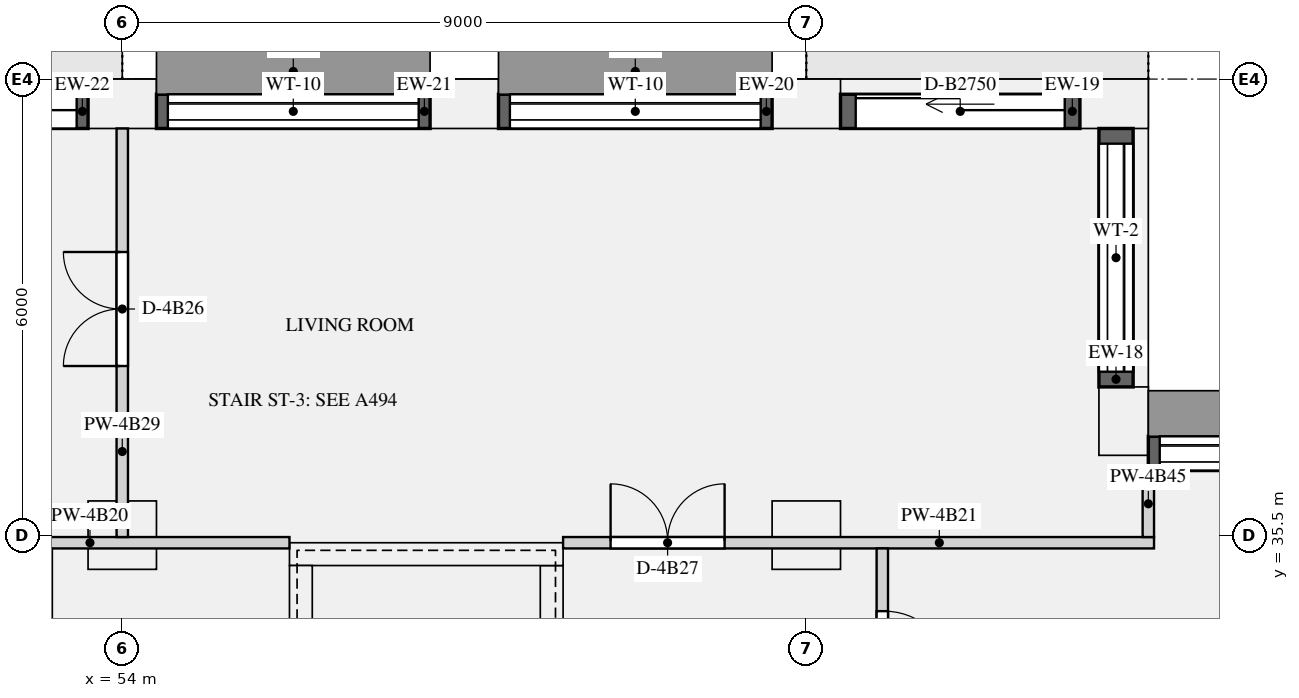
"""IFC4 building model, lengths in metres.
Left out: names, types, materials, properties, quantities, classifications, styles, units other than length and angle.
Written with IfcOpenShell. Run it as: python <this file> out.ifc"""

import sys

from ifc_helpers import new_model, si_unit, direction, frame, frame_2d, origin, origin_2d, place, context, subcontext, project, spatial, rectangle, extrude, element, fill, save


model = new_model("IFC4")
c1 = context("Model", 3, precision=1e-05, world=origin(), true_north=direction((0.0, 1.0)))
c2 = subcontext(c1, "Body", "Model", "MODEL_VIEW")
j1 = project(units=[si_unit("LENGTHUNIT", "METRE"), si_unit("PLANEANGLEUNIT", "RADIAN")], contexts=[c1])
p1 = place(None, origin())
s1 = spatial("IfcSite", under=j1, at=p1, CompositionType="ELEMENT")
p2 = place(p1, origin())
s2 = spatial("IfcBuilding", under=s1, at=p2, CompositionType="ELEMENT")
p3 = place(p2, frame((0.0, 0.0, 207.45)))
s3 = spatial("IfcBuildingStorey", under=s2, at=p3, CompositionType="ELEMENT", Elevation=207.45)
for number, where, z_axis, x_axis in (
    (1, (67.175, 37.0, 0.0), (0.0, 0.0, 1.0), (0.0, 1.0, 0.0)),
    (2, (67.05, 41.175, 0.0), (0.0, 0.0, 1.0), (-1.0, 0.0, 0.0)),
    (3, (63.0, 41.175, 0.0), (0.0, 0.0, 1.0), (-1.0, 0.0, 0.0)),
    (4, (58.5, 41.175, 0.0), (0.0, 0.0, 1.0), (-1.0, 0.0, 0.0)),
    (5, (54.0, 41.175, 0.0), (0.0, 0.0, 1.0), (-1.0, 0.0, 0.0)),
):
    element("IfcColumn", number, at=place(p3, frame(where, z_axis=z_axis, x_axis=x_axis)), inside=s3, PredefinedType="USERDEFINED", context=c2, shape_type="SweptSolid", body=[
        extrude(rectangle(XDim=0.9, YDim=0.65, at=origin_2d()), origin(), (0.0, 0.0, 1.0), 3.15),
    ])
for number, where, z_axis, x_axis in (
    (6, (54.0, 35.5, 0.0), (0.0, 0.0, 1.0), (1.0, 0.0, 0.0)),
    (7, (63.0, 35.5, 0.0), (0.0, 0.0, 1.0), (1.0, 0.0, 0.0)),
):
    element("IfcColumn", number, at=place(p3, frame(where, z_axis=z_axis, x_axis=x_axis)), inside=s3, PredefinedType="COLUMN", context=c2, shape_type="SweptSolid", body=[
        extrude(rectangle(XDim=0.9, YDim=0.9, at=origin_2d()), origin(), (0.0, 0.0, 1.0), 3.15),
    ])
p4 = place(p3, frame((56.2, 35.25, 0.0), z_axis=(0.0, 0.0, 1.0), x_axis=(1.0, 0.0, 0.0)))
e8 = element("IfcWall", 8, at=p4, inside=s3, PredefinedType="SHEAR", context=c2, shape_type="SweptSolid", body=[
    extrude(rectangle(XDim=3.6, YDim=0.3, at=frame_2d((1.8, 0.0))), origin(), (0.0, 0.0, 1.0), 3.15),
])
for number, where, z_axis, x_axis in (
    (9, (56.35, 27.3, 0.0), (0.0, 0.0, 1.0), (0.0, 1.0, 0.0)),
    (10, (59.65, 27.3, 0.0), (0.0, 0.0, 1.0), (0.0, 1.0, 0.0)),
):
    element("IfcWall", number, at=place(p3, frame(where, z_axis=z_axis, x_axis=x_axis)), inside=s3, PredefinedType="SHEAR", context=c2, shape_type="SweptSolid", body=[
        extrude(rectangle(XDim=7.8, YDim=0.3, at=frame_2d((3.9, 0.0))), origin(), (0.0, 0.0, 1.0), 3.15),
    ])
p5 = place(p3, frame((71.1, 36.575, 0.9), z_axis=(0.0, 0.0, 1.0), x_axis=(-1.0, 0.0, 0.0)))
e11 = element("IfcWall", 11, at=p5, inside=s3, PredefinedType="SOLIDWALL", context=c2, shape_type="SweptSolid", body=[
    extrude(rectangle(XDim=3.6, YDim=0.45, at=frame_2d((1.8, 0.0))), origin(), (0.0, 0.0, 1.0), 1.93),
])
p6 = place(p5, frame((0.15, 0.0, 0.15)))
e12 = element("IfcOpeningElement", 12, at=p6, cuts=e11, PredefinedType="OPENING", context=c2, shape_type="SweptSolid", body=[
    extrude(rectangle(XDim=3.3, YDim=1.5, at=frame_2d((1.65, 0.75))), frame((0.0, 0.235, 0.0), z_axis=(0.0, -1.0, 0.0), x_axis=(1.0, 0.0, 0.0)), (0.0, 0.0, 1.0), 0.47),
])
p7 = place(p3, frame((67.075, 37.45, 0.9), z_axis=(0.0, 0.0, 1.0), x_axis=(0.0, 1.0, 0.0)))
e13 = element("IfcWall", 13, at=p7, inside=s3, PredefinedType="SOLIDWALL", context=c2, shape_type="SweptSolid", body=[
    extrude(rectangle(XDim=3.4, YDim=0.45, at=frame_2d((1.7, 0.0))), origin(), (0.0, 0.0, 1.0), 1.93),
])
p8 = place(p7, frame((0.2, 0.0, 0.15)))
e14 = element("IfcOpeningElement", 14, at=p8, cuts=e13, PredefinedType="OPENING", context=c2, shape_type="SweptSolid", body=[
    extrude(rectangle(XDim=3.0, YDim=1.5, at=frame_2d((1.5, 0.75))), frame((0.0, 0.235, 0.0), z_axis=(0.0, -1.0, 0.0), x_axis=(1.0, 0.0, 0.0)), (0.0, 0.0, 1.0), 0.47),
])
p9 = place(p3, frame((66.6, 41.075, 0.0), z_axis=(0.0, 0.0, 1.0), x_axis=(-1.0, 0.0, 0.0)))
e15 = element("IfcWall", 15, at=p9, inside=s3, PredefinedType="SOLIDWALL", context=c2, shape_type="SweptSolid", body=[
    extrude(rectangle(XDim=3.15, YDim=0.45, at=frame_2d((1.575, 0.0))), origin(), (0.0, 0.0, 1.0), 2.83),
])
p10 = place(p9, frame((0.2, 0.0, 0.0)))
e16 = element("IfcOpeningElement", 16, at=p10, cuts=e15, PredefinedType="OPENING", context=c2, shape_type="SweptSolid", body=[
    extrude(rectangle(XDim=2.75, YDim=2.3, at=frame_2d((1.375, 1.15))), frame((0.0, 0.235, 0.0), z_axis=(0.0, -1.0, 0.0), x_axis=(1.0, 0.0, 0.0)), (0.0, 0.0, 1.0), 0.47),
])
p11 = place(p3, frame((62.55, 41.075, 0.9), z_axis=(0.0, 0.0, 1.0), x_axis=(-1.0, 0.0, 0.0)))
e17 = element("IfcWall", 17, at=p11, inside=s3, PredefinedType="SOLIDWALL", context=c2, shape_type="SweptSolid", body=[
    extrude(rectangle(XDim=3.6, YDim=0.45, at=frame_2d((1.8, 0.0))), origin(), (0.0, 0.0, 1.0), 1.93),
])
p12 = place(p11, frame((0.15, 0.0, 0.15)))
e18 = element("IfcOpeningElement", 18, at=p12, cuts=e17, PredefinedType="OPENING", context=c2, shape_type="SweptSolid", body=[
    extrude(rectangle(XDim=3.3, YDim=1.5, at=frame_2d((1.65, 0.75))), frame((0.0, 0.235, 0.0), z_axis=(0.0, -1.0, 0.0), x_axis=(1.0, 0.0, 0.0)), (0.0, 0.0, 1.0), 0.47),
])
p13 = place(p3, frame((58.05, 41.075, 0.9), z_axis=(0.0, 0.0, 1.0), x_axis=(-1.0, 0.0, 0.0)))
e19 = element("IfcWall", 19, at=p13, inside=s3, PredefinedType="SOLIDWALL", context=c2, shape_type="SweptSolid", body=[
    extrude(rectangle(XDim=3.6, YDim=0.45, at=frame_2d((1.8, 0.0))), origin(), (0.0, 0.0, 1.0), 1.93),
])
p14 = place(p13, frame((0.15, 0.0, 0.15)))
e20 = element("IfcOpeningElement", 20, at=p14, cuts=e19, PredefinedType="OPENING", context=c2, shape_type="SweptSolid", body=[
    extrude(rectangle(XDim=3.3, YDim=1.5, at=frame_2d((1.65, 0.75))), frame((0.0, 0.235, 0.0), z_axis=(0.0, -1.0, 0.0), x_axis=(1.0, 0.0, 0.0)), (0.0, 0.0, 1.0), 0.47),
])
p15 = place(p3, frame((53.55, 41.075, 0.0), z_axis=(0.0, 0.0, 1.0), x_axis=(-1.0, 0.0, 0.0)))
e21 = element("IfcWall", 21, at=p15, inside=s3, PredefinedType="SOLIDWALL", context=c2, shape_type="SweptSolid", body=[
    extrude(rectangle(XDim=3.6, YDim=0.45, at=frame_2d((1.8, 0.0))), origin(), (0.0, 0.0, 1.0), 2.83),
])
p16 = place(p15, frame((0.15, 0.0, 0.0)))
e22 = element("IfcOpeningElement", 22, at=p16, cuts=e21, PredefinedType="OPENING", context=c2, shape_type="SweptSolid", body=[
    extrude(rectangle(XDim=3.3, YDim=2.3, at=frame_2d((1.65, 1.15))), frame((0.0, 0.235, 0.0), z_axis=(0.0, -1.0, 0.0), x_axis=(1.0, 0.0, 0.0)), (0.0, 0.0, 1.0), 0.47),
])
p17 = place(p3, frame((45.0, 35.4, 0.0), z_axis=(0.0, 0.0, 1.0), x_axis=(1.0, 0.0, 0.0)))
e23 = element("IfcWall", 23, at=p17, inside=s3, PredefinedType="PARTITIONING", context=c2, shape_type="SweptSolid", body=[
    extrude(rectangle(XDim=11.2, YDim=0.15, at=frame_2d((5.6, 0.0))), origin(), (0.0, 0.0, 1.0), 2.83),
])
p18 = place(p17, frame((0.975, 0.0, 0.0)))
e24 = element("IfcOpeningElement", 24, at=p18, cuts=e23, PredefinedType="OPENING", context=c2, shape_type="SweptSolid", body=[
    extrude(rectangle(XDim=1.5, YDim=2.1, at=frame_2d((0.75, 1.05))), frame((0.0, 0.085, 0.0), z_axis=(0.0, -1.0, 0.0), x_axis=(1.0, 0.0, 0.0)), (0.0, 0.0, 1.0), 0.17),
])
p19 = place(p17, frame((5.05, 0.0, 0.0)))
e25 = element("IfcOpeningElement", 25, at=p19, cuts=e23, PredefinedType="OPENING", context=c2, shape_type="SweptSolid", body=[
    extrude(rectangle(XDim=0.9, YDim=2.1, at=frame_2d((0.45, 1.05))), frame((0.0, 0.085, 0.0), z_axis=(0.0, -1.0, 0.0), x_axis=(1.0, 0.0, 0.0)), (0.0, 0.0, 1.0), 0.17),
])
p20 = place(p3, frame((59.8, 35.4, 0.0), z_axis=(0.0, 0.0, 1.0), x_axis=(1.0, 0.0, 0.0)))
e26 = element("IfcWall", 26, at=p20, inside=s3, PredefinedType="PARTITIONING", context=c2, shape_type="SweptSolid", body=[
    extrude(rectangle(XDim=7.775, YDim=0.15, at=frame_2d((3.887, 0.0))), origin(), (0.0, 0.0, 1.0), 2.83),
])
p21 = place(p20, frame((0.625, 0.0, 0.0)))
e27 = element("IfcOpeningElement", 27, at=p21, cuts=e26, PredefinedType="OPENING", context=c2, shape_type="SweptSolid", body=[
    extrude(rectangle(XDim=1.5, YDim=2.1, at=frame_2d((0.75, 1.05))), frame((0.0, 0.085, 0.0), z_axis=(0.0, -1.0, 0.0), x_axis=(1.0, 0.0, 0.0)), (0.0, 0.0, 1.0), 0.17),
])
p22 = place(p3, frame((54.0, 35.475, 0.0), z_axis=(0.0, 0.0, 1.0), x_axis=(0.0, 1.0, 0.0)))
e28 = element("IfcWall", 28, at=p22, inside=s3, PredefinedType="PARTITIONING", context=c2, shape_type="SweptSolid", body=[
    extrude(rectangle(XDim=5.375, YDim=0.15, at=frame_2d((2.688, 0.0))), origin(), (0.0, 0.0, 1.0), 2.83),
])
p23 = place(p22, frame((2.25, 0.0, 0.0)))
e29 = element("IfcOpeningElement", 29, at=p23, cuts=e28, PredefinedType="OPENING", context=c2, shape_type="SweptSolid", body=[
    extrude(rectangle(XDim=1.5, YDim=2.1, at=frame_2d((0.75, 1.05))), frame((0.0, 0.085, 0.0), z_axis=(0.0, -1.0, 0.0), x_axis=(1.0, 0.0, 0.0)), (0.0, 0.0, 1.0), 0.17),
])
p24 = place(p3, frame((67.5, 35.475, 0.0), z_axis=(0.0, 0.0, 1.0), x_axis=(0.0, 1.0, 0.0)))
e30 = element("IfcWall", 30, at=p24, inside=s3, PredefinedType="PARTITIONING", context=c2, shape_type="SweptSolid", body=[
    extrude(rectangle(XDim=0.875, YDim=0.15, at=frame_2d((0.438, 0.0))), origin(), (0.0, 0.0, 1.0), 2.83),
])
p25 = place(p3, frame((64.0, 28.6, 0.0), z_axis=(0.0, 0.0, 1.0), x_axis=(0.0, 1.0, 0.0)))
e31 = element("IfcWall", 31, at=p25, inside=s3, PredefinedType="PARTITIONING", context=c2, shape_type="SweptSolid", body=[
    extrude(rectangle(XDim=6.725, YDim=0.15, at=frame_2d((3.362, 0.0))), origin(), (0.0, 0.0, 1.0), 2.83),
])
p26 = place(p25, frame((2.825, 0.0, 0.0)))
e32 = element("IfcOpeningElement", 32, at=p26, cuts=e31, PredefinedType="OPENING", context=c2, shape_type="SweptSolid", body=[
    extrude(rectangle(XDim=0.9, YDim=2.1, at=frame_2d((0.45, 1.05))), frame((0.0, 0.085, 0.0), z_axis=(0.0, -1.0, 0.0), x_axis=(1.0, 0.0, 0.0)), (0.0, 0.0, 1.0), 0.17),
])
p27 = place(p25, frame((5.0, 0.0, 0.0)))
e33 = element("IfcOpeningElement", 33, at=p27, cuts=e31, PredefinedType="OPENING", context=c2, shape_type="SweptSolid", body=[
    extrude(rectangle(XDim=0.9, YDim=2.1, at=frame_2d((0.45, 1.05))), frame((0.0, 0.085, 0.0), z_axis=(0.0, -1.0, 0.0), x_axis=(1.0, 0.0, 0.0)), (0.0, 0.0, 1.0), 0.17),
])
p28 = place(p6, origin())
e34 = element("IfcWindow", 34, at=p28, inside=s3, PartitioningType="SINGLE_PANEL", PredefinedType="WINDOW", context=c2, shape_type="SweptSolid", body=[
    extrude(rectangle(XDim=3.3, YDim=1.5, at=frame_2d((1.65, 0.75))), frame((0.0, -0.065, 0.0), z_axis=(0.0, -1.0, 0.0), x_axis=(1.0, 0.0, 0.0)), (0.0, 0.0, 1.0), 0.06),
])
fill(e12, e34)
p29 = place(p8, origin())
e35 = element("IfcWindow", 35, at=p29, inside=s3, PartitioningType="SINGLE_PANEL", PredefinedType="WINDOW", context=c2, shape_type="SweptSolid", body=[
    extrude(rectangle(XDim=3.0, YDim=1.5, at=frame_2d((1.5, 0.75))), frame((0.0, -0.065, 0.0), z_axis=(0.0, -1.0, 0.0), x_axis=(1.0, 0.0, 0.0)), (0.0, 0.0, 1.0), 0.06),
])
fill(e14, e35)
p30 = place(p10, origin())
e36 = element("IfcDoor", 36, at=p30, inside=s3, OperationType="SLIDING_TO_LEFT", PredefinedType="DOOR", context=c2, shape_type="SweptSolid", body=[
    extrude(rectangle(XDim=2.75, YDim=2.3, at=frame_2d((1.375, 1.15))), frame((0.0, -0.07, 0.0), z_axis=(0.0, -1.0, 0.0), x_axis=(1.0, 0.0, 0.0)), (0.0, 0.0, 1.0), 0.05),
])
fill(e16, e36)
p31 = place(p12, origin())
e37 = element("IfcWindow", 37, at=p31, inside=s3, PartitioningType="SINGLE_PANEL", PredefinedType="WINDOW", context=c2, shape_type="SweptSolid", body=[
    extrude(rectangle(XDim=3.3, YDim=1.5, at=frame_2d((1.65, 0.75))), frame((0.0, -0.065, 0.0), z_axis=(0.0, -1.0, 0.0), x_axis=(1.0, 0.0, 0.0)), (0.0, 0.0, 1.0), 0.06),
])
fill(e18, e37)
p32 = place(p14, origin())
e38 = element("IfcWindow", 38, at=p32, inside=s3, PartitioningType="SINGLE_PANEL", PredefinedType="WINDOW", context=c2, shape_type="SweptSolid", body=[
    extrude(rectangle(XDim=3.3, YDim=1.5, at=frame_2d((1.65, 0.75))), frame((0.0, -0.065, 0.0), z_axis=(0.0, -1.0, 0.0), x_axis=(1.0, 0.0, 0.0)), (0.0, 0.0, 1.0), 0.06),
])
fill(e20, e38)
p33 = place(p16, origin())
e39 = element("IfcDoor", 39, at=p33, inside=s3, OperationType="SLIDING_TO_LEFT", PredefinedType="DOOR", context=c2, shape_type="SweptSolid", body=[
    extrude(rectangle(XDim=3.3, YDim=2.3, at=frame_2d((1.65, 1.15))), frame((0.0, -0.07, 0.0), z_axis=(0.0, -1.0, 0.0), x_axis=(1.0, 0.0, 0.0)), (0.0, 0.0, 1.0), 0.05),
])
fill(e22, e39)
p34 = place(p23, origin())
e40 = element("IfcDoor", 40, at=p34, inside=s3, OperationType="DOUBLE_DOOR_SINGLE_SWING", PredefinedType="DOOR", context=c2, shape_type="SweptSolid", body=[
    extrude(rectangle(XDim=1.5, YDim=2.1, at=frame_2d((0.75, 1.05))), frame((0.0, 0.025, 0.0), z_axis=(0.0, -1.0, 0.0), x_axis=(1.0, 0.0, 0.0)), (0.0, 0.0, 1.0), 0.05),
])
fill(e29, e40)
p35 = place(p21, origin())
e41 = element("IfcDoor", 41, at=p35, inside=s3, OperationType="DOUBLE_DOOR_SINGLE_SWING", PredefinedType="DOOR", context=c2, shape_type="SweptSolid", body=[
    extrude(rectangle(XDim=1.5, YDim=2.1, at=frame_2d((0.75, 1.05))), frame((0.0, 0.025, 0.0), z_axis=(0.0, -1.0, 0.0), x_axis=(1.0, 0.0, 0.0)), (0.0, 0.0, 1.0), 0.05),
])
fill(e27, e41)
p36 = place(p27, frame((0.9, 0.0, 0.0), z_axis=(0.0, 0.0, 1.0), x_axis=(-1.0, 0.0, 0.0)))
e42 = element("IfcDoor", 42, at=p36, inside=s3, OperationType="SINGLE_SWING_RIGHT", PredefinedType="DOOR", context=c2, shape_type="SweptSolid", body=[
    extrude(rectangle(XDim=0.9, YDim=2.1, at=frame_2d((0.45, 1.05))), frame((0.0, 0.025, 0.0), z_axis=(0.0, -1.0, 0.0), x_axis=(1.0, 0.0, 0.0)), (0.0, 0.0, 1.0), 0.05),
])
fill(e33, e42)
save(model, sys.argv[1])
